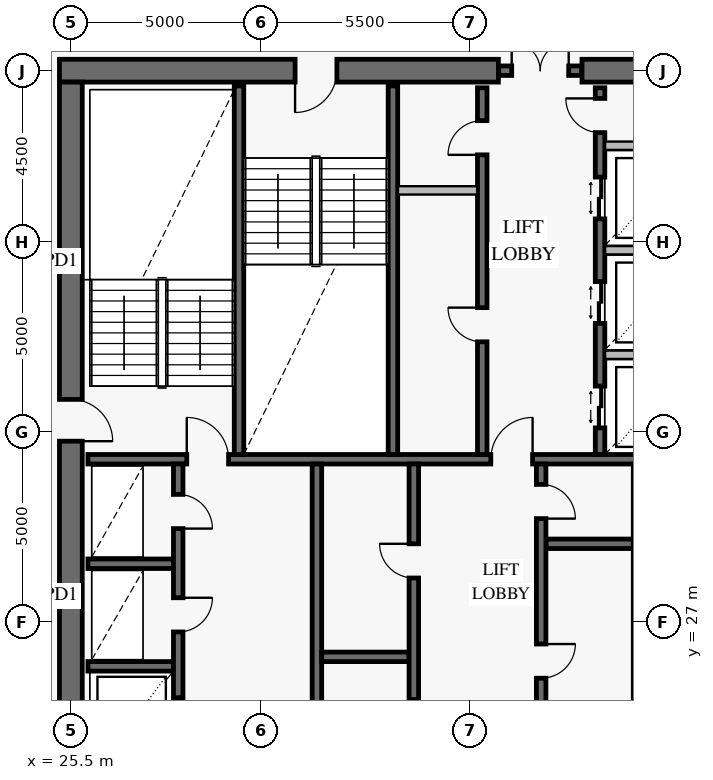
"""IFC4 building model, lengths in metres.
Left out: names, types, materials, properties, quantities, classifications, styles, units other than length and angle.
Written with IfcOpenShell. Run it as: python <this file> out.ifc"""

import sys

from ifc_helpers import new_model, si_unit, direction, frame, frame_2d, origin, place, context, subcontext, project, spatial, rectangle, extrude, element, fill, save


model = new_model("IFC4")
c1 = context("Model", 3, precision=1e-05, world=origin(), true_north=direction((0.0, 1.0)))
c2 = subcontext(c1, "Body", "Model", "MODEL_VIEW")
j1 = project(units=[si_unit("LENGTHUNIT", "METRE"), si_unit("PLANEANGLEUNIT", "RADIAN")], contexts=[c1])
p1 = place(None, origin())
s1 = spatial("IfcSite", under=j1, at=p1, CompositionType="ELEMENT")
p2 = place(p1, origin())
s2 = spatial("IfcBuilding", under=s1, at=p2, CompositionType="ELEMENT")
p3 = place(p2, frame((0.0, 0.0, 265.4)))
s3 = spatial("IfcBuildingStorey", under=s2, at=p3, CompositionType="ELEMENT", Elevation=265.4)
p4 = place(p3, frame((46.8, 41.5, 0.0), z_axis=(0.0, 0.0, 1.0), x_axis=(-1.0, 0.0, 0.0)))
e1 = element("IfcWall", 1, at=p4, inside=s3, PredefinedType="SHEAR", context=c2, shape_type="SweptSolid", body=[
    extrude(rectangle(XDim=7.85, YDim=0.6, at=frame_2d((3.925, 0.0))), origin(), (0.0, 0.0, 1.0), 3.8),
])
p5 = place(p3, frame((36.75, 41.5, 0.0), z_axis=(0.0, 0.0, 1.0), x_axis=(-1.0, 0.0, 0.0)))
e2 = element("IfcWall", 2, at=p5, inside=s3, PredefinedType="SHEAR", context=c2, shape_type="SweptSolid", body=[
    extrude(rectangle(XDim=11.55, YDim=0.6, at=frame_2d((5.775, 0.0))), origin(), (0.0, 0.0, 1.0), 3.8),
])
p6 = place(p5, frame((4.25, 0.0, 0.0)))
e3 = element("IfcOpeningElement", 3, at=p6, cuts=e2, PredefinedType="OPENING", context=c2, shape_type="SweptSolid", body=[
    extrude(rectangle(XDim=1.1, YDim=2.15, at=frame_2d((0.55, 1.075))), frame((0.0, 0.312, 0.0), z_axis=(0.0, -1.0, 0.0), x_axis=(1.0, 0.0, 0.0)), (0.0, 0.0, 1.0), 0.624),
])
p7 = place(p3, frame((25.5, 22.8, 0.0), z_axis=(0.0, 0.0, 1.0), x_axis=(0.0, 1.0, 0.0)))
e4 = element("IfcWall", 4, at=p7, inside=s3, PredefinedType="SHEAR", context=c2, shape_type="SweptSolid", body=[
    extrude(rectangle(XDim=18.4, YDim=0.6, at=frame_2d((9.2, 0.0))), origin(), (0.0, 0.0, 1.0), 3.8),
])
p8 = place(p7, frame((8.95, 0.0, 0.0)))
e5 = element("IfcOpeningElement", 5, at=p8, cuts=e4, PredefinedType="OPENING", context=c2, shape_type="SweptSolid", body=[
    extrude(rectangle(XDim=1.1, YDim=2.15, at=frame_2d((0.55, 1.075))), frame((0.0, 0.312, 0.0), z_axis=(0.0, -1.0, 0.0), x_axis=(1.0, 0.0, 0.0)), (0.0, 0.0, 1.0), 0.624),
])
p9 = place(p3, frame((36.76, 41.5, 0.0), z_axis=(0.0, 0.0, 1.0), x_axis=(1.0, 0.0, 0.0)))
e6 = element("IfcWall", 6, at=p9, inside=s3, PredefinedType="SOLIDWALL", context=c2, shape_type="SweptSolid", body=[
    extrude(rectangle(XDim=2.18, YDim=0.25, at=frame_2d((1.09, 0.0))), origin(), (0.0, 0.0, 1.0), 3.8),
])
p10 = place(p9, frame((0.34, 0.0, 0.0)))
e7 = element("IfcOpeningElement", 7, at=p10, cuts=e6, PredefinedType="OPENING", context=c2, shape_type="SweptSolid", body=[
    extrude(rectangle(XDim=1.5, YDim=2.15, at=frame_2d((0.75, 1.075))), frame((0.0, 0.137, 0.0), z_axis=(0.0, -1.0, 0.0), x_axis=(1.0, 0.0, 0.0)), (0.0, 0.0, 1.0), 0.274),
])
p11 = place(p3, frame((25.95, 31.275, 0.0), z_axis=(0.0, 0.0, 1.0), x_axis=(1.0, 0.0, 0.0)))
e8 = element("IfcWall", 8, at=p11, inside=s3, PredefinedType="SOLIDWALL", context=c2, shape_type="SweptSolid", body=[
    extrude(rectangle(XDim=20.1, YDim=0.25, at=frame_2d((10.05, 0.0))), origin(), (0.0, 0.0, 1.0), 3.8),
])
p12 = place(p11, frame((2.6, 0.0, 0.0)))
e9 = element("IfcOpeningElement", 9, at=p12, cuts=e8, PredefinedType="OPENING", context=c2, shape_type="SweptSolid", body=[
    extrude(rectangle(XDim=1.1, YDim=2.15, at=frame_2d((0.55, 1.075))), frame((0.0, 0.137, 0.0), z_axis=(0.0, -1.0, 0.0), x_axis=(1.0, 0.0, 0.0)), (0.0, 0.0, 1.0), 0.274),
])
p13 = place(p11, frame((10.6, 0.0, 0.0)))
e10 = element("IfcOpeningElement", 10, at=p13, cuts=e8, PredefinedType="OPENING", context=c2, shape_type="SweptSolid", body=[
    extrude(rectangle(XDim=1.1, YDim=2.15, at=frame_2d((0.55, 1.075))), frame((0.0, 0.137, 0.0), z_axis=(0.0, -1.0, 0.0), x_axis=(1.0, 0.0, 0.0)), (0.0, 0.0, 1.0), 0.274),
])
p14 = place(p11, frame((16.35, 0.0, 0.0)))
e11 = element("IfcOpeningElement", 11, at=p14, cuts=e8, PredefinedType="OPENING", context=c2, shape_type="SweptSolid", body=[
    extrude(rectangle(XDim=1.1, YDim=2.15, at=frame_2d((0.55, 1.075))), frame((0.0, 0.137, 0.0), z_axis=(0.0, -1.0, 0.0), x_axis=(1.0, 0.0, 0.0)), (0.0, 0.0, 1.0), 0.274),
])
for number, where, z_axis, x_axis in (
    (12, (29.925, 31.4, 0.0), (0.0, 0.0, 1.0), (0.0, 1.0, 0.0)),
    (13, (33.975, 31.4, 0.0), (0.0, 0.0, 1.0), (0.0, 1.0, 0.0)),
):
    element("IfcWall", number, at=place(p3, frame(where, z_axis=z_axis, x_axis=x_axis)), inside=s3, PredefinedType="SOLIDWALL", context=c2, shape_type="SweptSolid", body=[
        extrude(rectangle(XDim=9.7, YDim=0.25, at=frame_2d((4.85, 0.0))), origin(), (0.0, 0.0, 1.0), 3.8),
    ])
p15 = place(p3, frame((36.325, 31.4, 0.0), z_axis=(0.0, 0.0, 1.0), x_axis=(0.0, 1.0, 0.0)))
e14 = element("IfcWall", 14, at=p15, inside=s3, PredefinedType="SOLIDWALL", context=c2, shape_type="SweptSolid", body=[
    extrude(rectangle(XDim=9.65, YDim=0.25, at=frame_2d((4.825, 0.0))), origin(), (0.0, 0.0, 1.0), 3.8),
])
p16 = place(p15, frame((2.965, 0.0, 0.0)))
e15 = element("IfcOpeningElement", 15, at=p16, cuts=e14, PredefinedType="OPENING", context=c2, shape_type="SweptSolid", body=[
    extrude(rectangle(XDim=0.9, YDim=2.1, at=frame_2d((0.45, 1.05))), frame((0.0, 0.137, 0.0), z_axis=(0.0, -1.0, 0.0), x_axis=(1.0, 0.0, 0.0)), (0.0, 0.0, 1.0), 0.274),
])
p17 = place(p15, frame((7.885, 0.0, 0.0)))
e16 = element("IfcOpeningElement", 16, at=p17, cuts=e14, PredefinedType="OPENING", context=c2, shape_type="SweptSolid", body=[
    extrude(rectangle(XDim=0.9, YDim=2.1, at=frame_2d((0.45, 1.05))), frame((0.0, 0.137, 0.0), z_axis=(0.0, -1.0, 0.0), x_axis=(1.0, 0.0, 0.0)), (0.0, 0.0, 1.0), 0.274),
])
p18 = place(p3, frame((39.425, 31.4, 0.0), z_axis=(0.0, 0.0, 1.0), x_axis=(0.0, 1.0, 0.0)))
e17 = element("IfcWall", 17, at=p18, inside=s3, PredefinedType="SOLIDWALL", context=c2, shape_type="SweptSolid", body=[
    extrude(rectangle(XDim=9.65, YDim=0.25, at=frame_2d((4.825, 0.0))), origin(), (0.0, 0.0, 1.0), 3.8),
])
p19 = place(p18, frame((0.7, 0.0, 0.0)))
e18 = element("IfcOpeningElement", 18, at=p19, cuts=e17, PredefinedType="OPENING", context=c2, shape_type="SweptSolid", body=[
    extrude(rectangle(XDim=1.1, YDim=2.2, at=frame_2d((0.55, 1.1))), frame((0.0, 0.137, 0.0), z_axis=(0.0, -1.0, 0.0), x_axis=(1.0, 0.0, 0.0)), (0.0, 0.0, 1.0), 0.274),
])
p20 = place(p18, frame((3.45, 0.0, 0.0)))
e19 = element("IfcOpeningElement", 19, at=p20, cuts=e17, PredefinedType="OPENING", context=c2, shape_type="SweptSolid", body=[
    extrude(rectangle(XDim=1.1, YDim=2.2, at=frame_2d((0.55, 1.1))), frame((0.0, 0.137, 0.0), z_axis=(0.0, -1.0, 0.0), x_axis=(1.0, 0.0, 0.0)), (0.0, 0.0, 1.0), 0.274),
])
p21 = place(p18, frame((6.2, 0.0, 0.0)))
e20 = element("IfcOpeningElement", 20, at=p21, cuts=e17, PredefinedType="OPENING", context=c2, shape_type="SweptSolid", body=[
    extrude(rectangle(XDim=1.1, YDim=2.2, at=frame_2d((0.55, 1.1))), frame((0.0, 0.137, 0.0), z_axis=(0.0, -1.0, 0.0), x_axis=(1.0, 0.0, 0.0)), (0.0, 0.0, 1.0), 0.274),
])
p22 = place(p18, frame((8.47, 0.0, 0.0)))
e21 = element("IfcOpeningElement", 21, at=p22, cuts=e17, PredefinedType="OPENING", context=c2, shape_type="SweptSolid", body=[
    extrude(rectangle(XDim=0.9, YDim=2.1, at=frame_2d((0.45, 1.05))), frame((0.0, 0.137, 0.0), z_axis=(0.0, -1.0, 0.0), x_axis=(1.0, 0.0, 0.0)), (0.0, 0.0, 1.0), 0.274),
])
for number, where, z_axis, x_axis in (
    (22, (25.95, 25.825, 0.0), (0.0, 0.0, 1.0), (1.0, 0.0, 0.0)),
    (23, (25.95, 28.525, 0.0), (0.0, 0.0, 1.0), (1.0, 0.0, 0.0)),
):
    element("IfcWall", number, at=place(p3, frame(where, z_axis=z_axis, x_axis=x_axis)), inside=s3, PredefinedType="SOLIDWALL", context=c2, shape_type="SweptSolid", body=[
        extrude(rectangle(XDim=2.25, YDim=0.25, at=frame_2d((1.125, 0.0))), origin(), (0.0, 0.0, 1.0), 3.8),
    ])
p23 = place(p3, frame((28.325, 22.95, 0.0), z_axis=(0.0, 0.0, 1.0), x_axis=(0.0, 1.0, 0.0)))
e24 = element("IfcWall", 24, at=p23, inside=s3, PredefinedType="SOLIDWALL", context=c2, shape_type="SweptSolid", body=[
    extrude(rectangle(XDim=8.2, YDim=0.25, at=frame_2d((4.1, 0.0))), origin(), (0.0, 0.0, 1.0), 3.8),
])
p24 = place(p23, frame((0.75, 0.0, 0.0)))
e25 = element("IfcOpeningElement", 25, at=p24, cuts=e24, PredefinedType="OPENING", context=c2, shape_type="SweptSolid", body=[
    extrude(rectangle(XDim=1.3, YDim=2.3, at=frame_2d((0.65, 1.15))), frame((0.0, 0.137, 0.0), z_axis=(0.0, -1.0, 0.0), x_axis=(1.0, 0.0, 0.0)), (0.0, 0.0, 1.0), 0.274),
])
p25 = place(p23, frame((3.78, 0.0, 0.0)))
e26 = element("IfcOpeningElement", 26, at=p25, cuts=e24, PredefinedType="OPENING", context=c2, shape_type="SweptSolid", body=[
    extrude(rectangle(XDim=0.9, YDim=2.1, at=frame_2d((0.45, 1.05))), frame((0.0, 0.137, 0.0), z_axis=(0.0, -1.0, 0.0), x_axis=(1.0, 0.0, 0.0)), (0.0, 0.0, 1.0), 0.274),
])
p26 = place(p23, frame((6.5, 0.0, 0.0)))
e27 = element("IfcOpeningElement", 27, at=p26, cuts=e24, PredefinedType="OPENING", context=c2, shape_type="SweptSolid", body=[
    extrude(rectangle(XDim=0.9, YDim=2.1, at=frame_2d((0.45, 1.05))), frame((0.0, 0.137, 0.0), z_axis=(0.0, -1.0, 0.0), x_axis=(1.0, 0.0, 0.0)), (0.0, 0.0, 1.0), 0.274),
])
p27 = place(p3, frame((31.975, 22.95, 0.0), z_axis=(0.0, 0.0, 1.0), x_axis=(0.0, 1.0, 0.0)))
e28 = element("IfcWall", 28, at=p27, inside=s3, PredefinedType="SOLIDWALL", context=c2, shape_type="SweptSolid", body=[
    extrude(rectangle(XDim=8.2, YDim=0.25, at=frame_2d((4.1, 0.0))), origin(), (0.0, 0.0, 1.0), 3.8),
])
p28 = place(p3, frame((32.1, 26.075, 0.0), z_axis=(0.0, 0.0, 1.0), x_axis=(1.0, 0.0, 0.0)))
e29 = element("IfcWall", 29, at=p28, inside=s3, PredefinedType="SOLIDWALL", context=c2, shape_type="SweptSolid", body=[
    extrude(rectangle(XDim=2.3, YDim=0.25, at=frame_2d((1.15, 0.0))), origin(), (0.0, 0.0, 1.0), 3.8),
])
p29 = place(p3, frame((34.525, 22.95, 0.0), z_axis=(0.0, 0.0, 1.0), x_axis=(0.0, 1.0, 0.0)))
e30 = element("IfcWall", 30, at=p29, inside=s3, PredefinedType="SOLIDWALL", context=c2, shape_type="SweptSolid", body=[
    extrude(rectangle(XDim=8.2, YDim=0.25, at=frame_2d((4.1, 0.0))), origin(), (0.0, 0.0, 1.0), 3.8),
])
p30 = place(p29, frame((1.1, 0.0, 0.0)))
e31 = element("IfcOpeningElement", 31, at=p30, cuts=e30, PredefinedType="OPENING", context=c2, shape_type="SweptSolid", body=[
    extrude(rectangle(XDim=0.9, YDim=2.1, at=frame_2d((0.45, 1.05))), frame((0.0, 0.137, 0.0), z_axis=(0.0, -1.0, 0.0), x_axis=(1.0, 0.0, 0.0)), (0.0, 0.0, 1.0), 0.274),
])
p31 = place(p29, frame((5.2, 0.0, 0.0)))
e32 = element("IfcOpeningElement", 32, at=p31, cuts=e30, PredefinedType="OPENING", context=c2, shape_type="SweptSolid", body=[
    extrude(rectangle(XDim=0.9, YDim=2.1, at=frame_2d((0.45, 1.05))), frame((0.0, 0.137, 0.0), z_axis=(0.0, -1.0, 0.0), x_axis=(1.0, 0.0, 0.0)), (0.0, 0.0, 1.0), 0.274),
])
p32 = place(p3, frame((38.0, 29.05, 0.0), z_axis=(0.0, 0.0, 1.0), x_axis=(1.0, 0.0, 0.0)))
e33 = element("IfcWall", 33, at=p32, inside=s3, PredefinedType="SOLIDWALL", context=c2, shape_type="SweptSolid", body=[
    extrude(rectangle(XDim=2.3, YDim=0.25, at=frame_2d((1.15, 0.0))), origin(), (0.0, 0.0, 1.0), 3.8),
])
p33 = place(p3, frame((37.875, 22.95, 0.0), z_axis=(0.0, 0.0, 1.0), x_axis=(0.0, 1.0, 0.0)))
e34 = element("IfcWall", 34, at=p33, inside=s3, PredefinedType="SOLIDWALL", context=c2, shape_type="SweptSolid", body=[
    extrude(rectangle(XDim=8.2, YDim=0.25, at=frame_2d((4.1, 0.0))), origin(), (0.0, 0.0, 1.0), 3.8),
])
p34 = place(p33, frame((2.562, 0.0, 0.0)))
e35 = element("IfcOpeningElement", 35, at=p34, cuts=e34, PredefinedType="OPENING", context=c2, shape_type="SweptSolid", body=[
    extrude(rectangle(XDim=0.9, YDim=2.1, at=frame_2d((0.45, 1.05))), frame((0.0, 0.137, 0.0), z_axis=(0.0, -1.0, 0.0), x_axis=(1.0, 0.0, 0.0)), (0.0, 0.0, 1.0), 0.274),
])
p35 = place(p33, frame((6.762, 0.0, 0.0)))
e36 = element("IfcOpeningElement", 36, at=p35, cuts=e34, PredefinedType="OPENING", context=c2, shape_type="SweptSolid", body=[
    extrude(rectangle(XDim=0.9, YDim=2.1, at=frame_2d((0.45, 1.05))), frame((0.0, 0.137, 0.0), z_axis=(0.0, -1.0, 0.0), x_axis=(1.0, 0.0, 0.0)), (0.0, 0.0, 1.0), 0.274),
])
p36 = place(p3, frame((34.108, 38.35, 0.0), z_axis=(0.0, 0.0, 1.0), x_axis=(1.0, 0.0, 0.0)))
e37 = element("IfcWall", 37, at=p36, inside=s3, PredefinedType="PARTITIONING", context=c2, shape_type="SweptSolid", body=[
    extrude(rectangle(XDim=2.084, YDim=0.22, at=frame_2d((1.042, 0.0))), origin(), (0.0, 0.0, 1.0), 3.55),
])
for number, where, z_axis, x_axis in (
    (38, (39.558, 34.025, 0.0), (0.0, 0.0, 1.0), (1.0, 0.0, 0.0)),
    (39, (39.558, 36.775, 0.0), (0.0, 0.0, 1.0), (1.0, 0.0, 0.0)),
    (40, (39.558, 39.525, 0.0), (0.0, 0.0, 1.0), (1.0, 0.0, 0.0)),
):
    element("IfcWall", number, at=place(p3, frame(where, z_axis=z_axis, x_axis=x_axis)), inside=s3, PredefinedType="PARTITIONING", context=c2, shape_type="SweptSolid", body=[
        extrude(rectangle(XDim=2.384, YDim=0.22, at=frame_2d((1.192, 0.0))), origin(), (0.0, 0.0, 1.0), 3.55),
    ])
p37 = place(p8, frame((1.1, 0.0, 0.0), z_axis=(0.0, 0.0, 1.0), x_axis=(-1.0, 0.0, 0.0)))
e41 = element("IfcDoor", 41, at=p37, inside=s3, OperationType="SINGLE_SWING_RIGHT", PredefinedType="USERDEFINED", context=c2, shape_type="SweptSolid", body=[
    extrude(rectangle(XDim=1.1, YDim=2.15, at=frame_2d((0.55, 1.075))), frame((0.0, 0.025, 0.0), z_axis=(0.0, -1.0, 0.0), x_axis=(1.0, 0.0, 0.0)), (0.0, 0.0, 1.0), 0.05),
])
fill(e5, e41)
p38 = place(p6, origin())
e42 = element("IfcDoor", 42, at=p38, inside=s3, OperationType="SINGLE_SWING_RIGHT", PredefinedType="USERDEFINED", context=c2, shape_type="SweptSolid", body=[
    extrude(rectangle(XDim=1.1, YDim=2.15, at=frame_2d((0.55, 1.075))), frame((0.0, 0.025, 0.0), z_axis=(0.0, -1.0, 0.0), x_axis=(1.0, 0.0, 0.0)), (0.0, 0.0, 1.0), 0.05),
])
fill(e3, e42)
p39 = place(p10, origin())
e43 = element("IfcDoor", 43, at=p39, inside=s3, OperationType="DOUBLE_DOOR_SINGLE_SWING", PredefinedType="DOOR", context=c2, shape_type="SweptSolid", body=[
    extrude(rectangle(XDim=1.5, YDim=2.15, at=frame_2d((0.75, 1.075))), frame((0.0, 0.025, 0.0), z_axis=(0.0, -1.0, 0.0), x_axis=(1.0, 0.0, 0.0)), (0.0, 0.0, 1.0), 0.05),
])
fill(e7, e43)
p40 = place(p12, origin())
e44 = element("IfcDoor", 44, at=p40, inside=s3, OperationType="SINGLE_SWING_LEFT", PredefinedType="USERDEFINED", context=c2, shape_type="SweptSolid", body=[
    extrude(rectangle(XDim=1.1, YDim=2.15, at=frame_2d((0.55, 1.075))), frame((0.0, 0.025, 0.0), z_axis=(0.0, -1.0, 0.0), x_axis=(1.0, 0.0, 0.0)), (0.0, 0.0, 1.0), 0.05),
])
fill(e9, e44)
p41 = place(p13, origin())
e45 = element("IfcDoor", 45, at=p41, inside=s3, OperationType="SINGLE_SWING_RIGHT", PredefinedType="USERDEFINED", context=c2, shape_type="SweptSolid", body=[
    extrude(rectangle(XDim=1.1, YDim=2.15, at=frame_2d((0.55, 1.075))), frame((0.0, 0.025, 0.0), z_axis=(0.0, -1.0, 0.0), x_axis=(1.0, 0.0, 0.0)), (0.0, 0.0, 1.0), 0.05),
])
fill(e10, e45)
p42 = place(p16, origin())
e46 = element("IfcDoor", 46, at=p42, inside=s3, OperationType="SINGLE_SWING_RIGHT", PredefinedType="DOOR", context=c2, shape_type="SweptSolid", body=[
    extrude(rectangle(XDim=0.9, YDim=2.1, at=frame_2d((0.45, 1.05))), frame((0.0, 0.025, 0.0), z_axis=(0.0, -1.0, 0.0), x_axis=(1.0, 0.0, 0.0)), (0.0, 0.0, 1.0), 0.05),
])
fill(e15, e46)
p43 = place(p17, origin())
e47 = element("IfcDoor", 47, at=p43, inside=s3, OperationType="SINGLE_SWING_LEFT", PredefinedType="DOOR", context=c2, shape_type="SweptSolid", body=[
    extrude(rectangle(XDim=0.9, YDim=2.1, at=frame_2d((0.45, 1.05))), frame((0.0, 0.025, 0.0), z_axis=(0.0, -1.0, 0.0), x_axis=(1.0, 0.0, 0.0)), (0.0, 0.0, 1.0), 0.05),
])
fill(e16, e47)
p44 = place(p19, origin())
e48 = element("IfcDoor", 48, at=p44, inside=s3, OperationType="DOUBLE_DOOR_SLIDING", PredefinedType="DOOR", context=c2, shape_type="SweptSolid", body=[
    extrude(rectangle(XDim=1.1, YDim=2.2, at=frame_2d((0.55, 1.1))), frame((0.0, 0.025, 0.0), z_axis=(0.0, -1.0, 0.0), x_axis=(1.0, 0.0, 0.0)), (0.0, 0.0, 1.0), 0.05),
])
fill(e18, e48)
p45 = place(p20, origin())
e49 = element("IfcDoor", 49, at=p45, inside=s3, OperationType="DOUBLE_DOOR_SLIDING", PredefinedType="DOOR", context=c2, shape_type="SweptSolid", body=[
    extrude(rectangle(XDim=1.1, YDim=2.2, at=frame_2d((0.55, 1.1))), frame((0.0, 0.025, 0.0), z_axis=(0.0, -1.0, 0.0), x_axis=(1.0, 0.0, 0.0)), (0.0, 0.0, 1.0), 0.05),
])
fill(e19, e49)
p46 = place(p21, origin())
e50 = element("IfcDoor", 50, at=p46, inside=s3, OperationType="DOUBLE_DOOR_SLIDING", PredefinedType="DOOR", context=c2, shape_type="SweptSolid", body=[
    extrude(rectangle(XDim=1.1, YDim=2.2, at=frame_2d((0.55, 1.1))), frame((0.0, 0.025, 0.0), z_axis=(0.0, -1.0, 0.0), x_axis=(1.0, 0.0, 0.0)), (0.0, 0.0, 1.0), 0.05),
])
fill(e20, e50)
p47 = place(p22, origin())
e51 = element("IfcDoor", 51, at=p47, inside=s3, OperationType="SINGLE_SWING_RIGHT", PredefinedType="DOOR", context=c2, shape_type="SweptSolid", body=[
    extrude(rectangle(XDim=0.9, YDim=2.1, at=frame_2d((0.45, 1.05))), frame((0.0, 0.025, 0.0), z_axis=(0.0, -1.0, 0.0), x_axis=(1.0, 0.0, 0.0)), (0.0, 0.0, 1.0), 0.05),
])
fill(e21, e51)
p48 = place(p24, frame((1.3, 0.0, 0.0), z_axis=(0.0, 0.0, 1.0), x_axis=(-1.0, 0.0, 0.0)))
e52 = element("IfcDoor", 52, at=p48, inside=s3, OperationType="DOUBLE_DOOR_SLIDING", PredefinedType="DOOR", context=c2, shape_type="SweptSolid", body=[
    extrude(rectangle(XDim=1.3, YDim=2.3, at=frame_2d((0.65, 1.15))), frame((0.0, 0.025, 0.0), z_axis=(0.0, -1.0, 0.0), x_axis=(1.0, 0.0, 0.0)), (0.0, 0.0, 1.0), 0.05),
])
fill(e25, e52)
p49 = place(p25, frame((0.9, 0.0, 0.0), z_axis=(0.0, 0.0, 1.0), x_axis=(-1.0, 0.0, 0.0)))
e53 = element("IfcDoor", 53, at=p49, inside=s3, OperationType="SINGLE_SWING_LEFT", PredefinedType="DOOR", context=c2, shape_type="SweptSolid", body=[
    extrude(rectangle(XDim=0.9, YDim=2.1, at=frame_2d((0.45, 1.05))), frame((0.0, 0.025, 0.0), z_axis=(0.0, -1.0, 0.0), x_axis=(1.0, 0.0, 0.0)), (0.0, 0.0, 1.0), 0.05),
])
fill(e26, e53)
p50 = place(p26, frame((0.9, 0.0, 0.0), z_axis=(0.0, 0.0, 1.0), x_axis=(-1.0, 0.0, 0.0)))
e54 = element("IfcDoor", 54, at=p50, inside=s3, OperationType="SINGLE_SWING_RIGHT", PredefinedType="DOOR", context=c2, shape_type="SweptSolid", body=[
    extrude(rectangle(XDim=0.9, YDim=2.1, at=frame_2d((0.45, 1.05))), frame((0.0, 0.025, 0.0), z_axis=(0.0, -1.0, 0.0), x_axis=(1.0, 0.0, 0.0)), (0.0, 0.0, 1.0), 0.05),
])
fill(e27, e54)
p51 = place(p31, origin())
e55 = element("IfcDoor", 55, at=p51, inside=s3, OperationType="SINGLE_SWING_RIGHT", PredefinedType="DOOR", context=c2, shape_type="SweptSolid", body=[
    extrude(rectangle(XDim=0.9, YDim=2.1, at=frame_2d((0.45, 1.05))), frame((0.0, 0.025, 0.0), z_axis=(0.0, -1.0, 0.0), x_axis=(1.0, 0.0, 0.0)), (0.0, 0.0, 1.0), 0.05),
])
fill(e32, e55)
p52 = place(p34, frame((0.9, 0.0, 0.0), z_axis=(0.0, 0.0, 1.0), x_axis=(-1.0, 0.0, 0.0)))
e56 = element("IfcDoor", 56, at=p52, inside=s3, OperationType="SINGLE_SWING_LEFT", PredefinedType="DOOR", context=c2, shape_type="SweptSolid", body=[
    extrude(rectangle(XDim=0.9, YDim=2.1, at=frame_2d((0.45, 1.05))), frame((0.0, 0.025, 0.0), z_axis=(0.0, -1.0, 0.0), x_axis=(1.0, 0.0, 0.0)), (0.0, 0.0, 1.0), 0.05),
])
fill(e35, e56)
p53 = place(p35, frame((0.9, 0.0, 0.0), z_axis=(0.0, 0.0, 1.0), x_axis=(-1.0, 0.0, 0.0)))
e57 = element("IfcDoor", 57, at=p53, inside=s3, OperationType="SINGLE_SWING_RIGHT", PredefinedType="DOOR", context=c2, shape_type="SweptSolid", body=[
    extrude(rectangle(XDim=0.9, YDim=2.1, at=frame_2d((0.45, 1.05))), frame((0.0, 0.025, 0.0), z_axis=(0.0, -1.0, 0.0), x_axis=(1.0, 0.0, 0.0)), (0.0, 0.0, 1.0), 0.05),
])
fill(e36, e57)
save(model, sys.argv[1])
